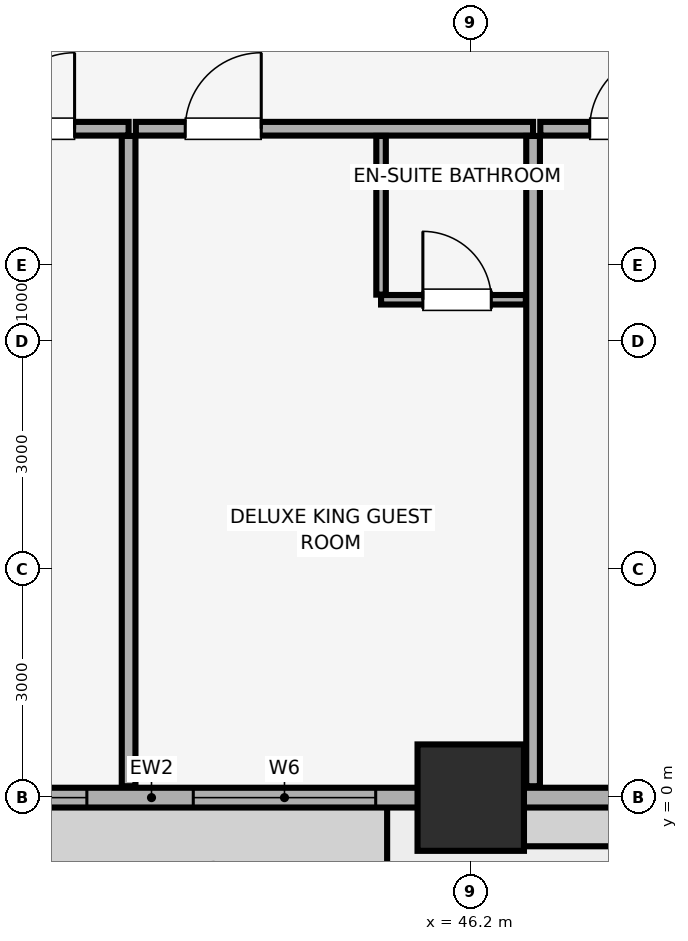
"""IFC4 building model, lengths in metres.
Left out: names, types, materials, properties, quantities, classifications, styles, units other than length and angle.
Written with IfcOpenShell. Run it as: python <this file> out.ifc"""

import sys

from ifc_helpers import new_model, si_unit, direction, frame, frame_2d, origin, origin_2d, place, context, subcontext, project, spatial, rectangle, extrude, element, fill, save


model = new_model("IFC4")
c1 = context("Model", 3, precision=1e-05, world=origin(), true_north=direction((0.0, 1.0)))
c2 = subcontext(c1, "Body", "Model", "MODEL_VIEW")
j1 = project(units=[si_unit("LENGTHUNIT", "METRE"), si_unit("PLANEANGLEUNIT", "RADIAN")], contexts=[c1])
p1 = place(None, origin())
s1 = spatial("IfcSite", under=j1, at=p1, CompositionType="ELEMENT")
p2 = place(p1, origin())
s2 = spatial("IfcBuilding", under=s1, at=p2, CompositionType="ELEMENT")
p3 = place(p2, frame((0.0, 0.0, 35.15)))
s3 = spatial("IfcBuildingStorey", under=s2, at=p3, CompositionType="ELEMENT", Elevation=35.15)
p4 = place(p3, frame((46.2, 0.0, 0.0), z_axis=(0.0, 0.0, 1.0), x_axis=(1.0, 0.0, 0.0)))
e1 = element("IfcColumn", 1, at=p4, inside=s3, PredefinedType="COLUMN", context=c2, shape_type="SweptSolid", body=[
    extrude(rectangle(XDim=1.4, YDim=1.4, at=origin_2d()), origin(), (0.0, 0.0, 1.0), 3.51),
])
p5 = place(p3, frame((4.2, 0.0, 0.0), z_axis=(0.0, 0.0, 1.0), x_axis=(1.0, 0.0, 0.0)))
e2 = element("IfcWall", 2, at=p5, inside=s3, PredefinedType="SOLIDWALL", context=c2, shape_type="SweptSolid", body=[
    extrude(rectangle(XDim=75.6, YDim=0.26, at=frame_2d((37.8, 0.0))), origin(), (0.0, 0.0, 1.0), 2.56),
])
p6 = place(p5, frame((13.517, 0.0, 0.0)))
e3 = element("IfcOpeningElement", 3, at=p6, cuts=e2, PredefinedType="OPENING", context=c2, shape_type="SweptSolid", body=[
    extrude(rectangle(XDim=1.1, YDim=2.15, at=frame_2d((0.55, 1.075))), frame((0.0, 0.14, 0.0), z_axis=(0.0, -1.0, 0.0), x_axis=(1.0, 0.0, 0.0)), (0.0, 0.0, 1.0), 0.28),
])
p7 = place(p5, frame((28.183, 0.0, 0.0)))
e4 = element("IfcOpeningElement", 4, at=p7, cuts=e2, PredefinedType="OPENING", context=c2, shape_type="SweptSolid", body=[
    extrude(rectangle(XDim=1.1, YDim=2.15, at=frame_2d((0.55, 1.075))), frame((0.0, 0.14, 0.0), z_axis=(0.0, -1.0, 0.0), x_axis=(1.0, 0.0, 0.0)), (0.0, 0.0, 1.0), 0.28),
])
p8 = place(p5, frame((60.983, 0.0, 0.0)))
e5 = element("IfcOpeningElement", 5, at=p8, cuts=e2, PredefinedType="OPENING", context=c2, shape_type="SweptSolid", body=[
    extrude(rectangle(XDim=1.1, YDim=2.15, at=frame_2d((0.55, 1.075))), frame((0.0, 0.14, 0.0), z_axis=(0.0, -1.0, 0.0), x_axis=(1.0, 0.0, 0.0)), (0.0, 0.0, 1.0), 0.28),
])
p9 = place(p5, frame((1.035, 0.0, 0.85)))
e6 = element("IfcOpeningElement", 6, at=p9, cuts=e2, PredefinedType="OPENING", context=c2, shape_type="SweptSolid", body=[
    extrude(rectangle(XDim=2.4, YDim=1.5, at=frame_2d((1.2, 0.75))), frame((0.0, 0.14, 0.0), z_axis=(0.0, -1.0, 0.0), x_axis=(1.0, 0.0, 0.0)), (0.0, 0.0, 1.0), 0.28),
])
p10 = place(p5, frame((7.031, 0.0, 0.85)))
e7 = element("IfcOpeningElement", 7, at=p10, cuts=e2, PredefinedType="OPENING", context=c2, shape_type="SweptSolid", body=[
    extrude(rectangle(XDim=2.4, YDim=1.5, at=frame_2d((1.2, 0.75))), frame((0.0, 0.14, 0.0), z_axis=(0.0, -1.0, 0.0), x_axis=(1.0, 0.0, 0.0)), (0.0, 0.0, 1.0), 0.28),
])
p11 = place(p5, frame((16.757, 0.0, 0.85)))
e8 = element("IfcOpeningElement", 8, at=p11, cuts=e2, PredefinedType="OPENING", context=c2, shape_type="SweptSolid", body=[
    extrude(rectangle(XDim=1.5, YDim=1.4, at=frame_2d((0.75, 0.7))), frame((0.0, 0.14, 0.0), z_axis=(0.0, -1.0, 0.0), x_axis=(1.0, 0.0, 0.0)), (0.0, 0.0, 1.0), 0.28),
])
p12 = place(p5, frame((22.567, 0.0, 0.85)))
e9 = element("IfcOpeningElement", 9, at=p12, cuts=e2, PredefinedType="OPENING", context=c2, shape_type="SweptSolid", body=[
    extrude(rectangle(XDim=2.4, YDim=1.5, at=frame_2d((1.2, 0.75))), frame((0.0, 0.14, 0.0), z_axis=(0.0, -1.0, 0.0), x_axis=(1.0, 0.0, 0.0)), (0.0, 0.0, 1.0), 0.28),
])
p13 = place(p5, frame((30.065, 0.0, 0.85)))
e10 = element("IfcOpeningElement", 10, at=p13, cuts=e2, PredefinedType="OPENING", context=c2, shape_type="SweptSolid", body=[
    extrude(rectangle(XDim=1.5, YDim=1.4, at=frame_2d((0.75, 0.7))), frame((0.0, 0.14, 0.0), z_axis=(0.0, -1.0, 0.0), x_axis=(1.0, 0.0, 0.0)), (0.0, 0.0, 1.0), 0.28),
])
p14 = place(p5, frame((34.55, 0.0, 0.85)))
e11 = element("IfcOpeningElement", 11, at=p14, cuts=e2, PredefinedType="OPENING", context=c2, shape_type="SweptSolid", body=[
    extrude(rectangle(XDim=2.4, YDim=1.5, at=frame_2d((1.2, 0.75))), frame((0.0, 0.14, 0.0), z_axis=(0.0, -1.0, 0.0), x_axis=(1.0, 0.0, 0.0)), (0.0, 0.0, 1.0), 0.28),
])
p15 = place(p5, frame((38.35, 0.0, 0.85)))
e12 = element("IfcOpeningElement", 12, at=p15, cuts=e2, PredefinedType="OPENING", context=c2, shape_type="SweptSolid", body=[
    extrude(rectangle(XDim=2.4, YDim=1.5, at=frame_2d((1.2, 0.75))), frame((0.0, 0.14, 0.0), z_axis=(0.0, -1.0, 0.0), x_axis=(1.0, 0.0, 0.0)), (0.0, 0.0, 1.0), 0.28),
])
p16 = place(p5, frame((44.281, 0.0, 0.85)))
e13 = element("IfcOpeningElement", 13, at=p16, cuts=e2, PredefinedType="OPENING", context=c2, shape_type="SweptSolid", body=[
    extrude(rectangle(XDim=2.4, YDim=1.5, at=frame_2d((1.2, 0.75))), frame((0.0, 0.14, 0.0), z_axis=(0.0, -1.0, 0.0), x_axis=(1.0, 0.0, 0.0)), (0.0, 0.0, 1.0), 0.28),
])
p17 = place(p5, frame((50.332, 0.0, 0.85)))
e14 = element("IfcOpeningElement", 14, at=p17, cuts=e2, PredefinedType="OPENING", context=c2, shape_type="SweptSolid", body=[
    extrude(rectangle(XDim=2.4, YDim=1.5, at=frame_2d((1.2, 0.75))), frame((0.0, 0.14, 0.0), z_axis=(0.0, -1.0, 0.0), x_axis=(1.0, 0.0, 0.0)), (0.0, 0.0, 1.0), 0.28),
])
p18 = place(p5, frame((53.981, 0.0, 0.85)))
e15 = element("IfcOpeningElement", 15, at=p18, cuts=e2, PredefinedType="OPENING", context=c2, shape_type="SweptSolid", body=[
    extrude(rectangle(XDim=1.5, YDim=1.4, at=frame_2d((0.75, 0.7))), frame((0.0, 0.14, 0.0), z_axis=(0.0, -1.0, 0.0), x_axis=(1.0, 0.0, 0.0)), (0.0, 0.0, 1.0), 0.28),
])
p19 = place(p5, frame((64.759, 0.0, 0.85)))
e16 = element("IfcOpeningElement", 16, at=p19, cuts=e2, PredefinedType="OPENING", context=c2, shape_type="SweptSolid", body=[
    extrude(rectangle(XDim=1.5, YDim=1.4, at=frame_2d((0.75, 0.7))), frame((0.0, 0.14, 0.0), z_axis=(0.0, -1.0, 0.0), x_axis=(1.0, 0.0, 0.0)), (0.0, 0.0, 1.0), 0.28),
])
p20 = place(p5, frame((67.509, 0.0, 0.85)))
e17 = element("IfcOpeningElement", 17, at=p20, cuts=e2, PredefinedType="OPENING", context=c2, shape_type="SweptSolid", body=[
    extrude(rectangle(XDim=2.4, YDim=1.5, at=frame_2d((1.2, 0.75))), frame((0.0, 0.14, 0.0), z_axis=(0.0, -1.0, 0.0), x_axis=(1.0, 0.0, 0.0)), (0.0, 0.0, 1.0), 0.28),
])
p21 = place(p5, frame((72.165, 0.0, 0.85)))
e18 = element("IfcOpeningElement", 18, at=p21, cuts=e2, PredefinedType="OPENING", context=c2, shape_type="SweptSolid", body=[
    extrude(rectangle(XDim=2.4, YDim=1.5, at=frame_2d((1.2, 0.75))), frame((0.0, 0.14, 0.0), z_axis=(0.0, -1.0, 0.0), x_axis=(1.0, 0.0, 0.0)), (0.0, 0.0, 1.0), 0.28),
])
p22 = place(p3, frame((36.472, 8.8, 0.0), z_axis=(0.0, 0.0, 1.0), x_axis=(1.0, 0.0, 0.0)))
e19 = element("IfcWall", 19, at=p22, inside=s3, PredefinedType="PARTITIONING", context=c2, shape_type="SweptSolid", body=[
    extrude(rectangle(XDim=5.226, YDim=0.18, at=frame_2d((2.613, 0.0))), origin(), (0.0, 0.0, 1.0), 3.51),
])
p23 = place(p22, frame((3.516, 0.0, 0.0)))
e20 = element("IfcOpeningElement", 20, at=p23, cuts=e19, PredefinedType="OPENING", context=c2, shape_type="SweptSolid", body=[
    extrude(rectangle(XDim=1.0, YDim=2.15, at=frame_2d((0.5, 1.075))), frame((0.0, 0.1, 0.0), z_axis=(0.0, -1.0, 0.0), x_axis=(1.0, 0.0, 0.0)), (0.0, 0.0, 1.0), 0.2),
])
p24 = place(p3, frame((41.699, 0.15, 0.0), z_axis=(0.0, 0.0, 1.0), x_axis=(0.0, 1.0, 0.0)))
e21 = element("IfcWall", 21, at=p24, inside=s3, PredefinedType="PARTITIONING", context=c2, shape_type="SweptSolid", body=[
    extrude(rectangle(XDim=8.555, YDim=0.18, at=frame_2d((4.278, 0.0))), origin(), (0.0, 0.0, 1.0), 3.51),
])
p25 = place(p3, frame((41.794, 8.8, 0.0), z_axis=(0.0, 0.0, 1.0), x_axis=(1.0, 0.0, 0.0)))
e22 = element("IfcWall", 22, at=p25, inside=s3, PredefinedType="PARTITIONING", context=c2, shape_type="SweptSolid", body=[
    extrude(rectangle(XDim=5.226, YDim=0.18, at=frame_2d((2.613, 0.0))), origin(), (0.0, 0.0, 1.0), 3.51),
])
p26 = place(p25, frame((0.65, 0.0, 0.0)))
e23 = element("IfcOpeningElement", 23, at=p26, cuts=e22, PredefinedType="OPENING", context=c2, shape_type="SweptSolid", body=[
    extrude(rectangle(XDim=1.0, YDim=2.15, at=frame_2d((0.5, 1.075))), frame((0.0, 0.1, 0.0), z_axis=(0.0, -1.0, 0.0), x_axis=(1.0, 0.0, 0.0)), (0.0, 0.0, 1.0), 0.2),
])
p27 = place(p3, frame((47.02, 0.15, 0.0), z_axis=(0.0, 0.0, 1.0), x_axis=(0.0, 1.0, 0.0)))
e24 = element("IfcWall", 24, at=p27, inside=s3, PredefinedType="PARTITIONING", context=c2, shape_type="SweptSolid", body=[
    extrude(rectangle(XDim=8.555, YDim=0.18, at=frame_2d((4.278, 0.0))), origin(), (0.0, 0.0, 1.0), 3.51),
])
p28 = place(p3, frame((45.02, 6.55, 0.0), z_axis=(0.0, 0.0, 1.0), x_axis=(1.0, 0.0, 0.0)))
e25 = element("IfcWall", 25, at=p28, inside=s3, PredefinedType="PARTITIONING", context=c2, shape_type="SweptSolid", body=[
    extrude(rectangle(XDim=1.905, YDim=0.125, at=frame_2d((0.953, 0.0))), origin(), (0.0, 0.0, 1.0), 3.51),
])
p29 = place(p28, frame((0.55, 0.0, 0.0)))
e26 = element("IfcOpeningElement", 26, at=p29, cuts=e25, PredefinedType="OPENING", context=c2, shape_type="SweptSolid", body=[
    extrude(rectangle(XDim=0.9, YDim=2.1, at=frame_2d((0.45, 1.05))), frame((0.0, 0.073, 0.0), z_axis=(0.0, -1.0, 0.0), x_axis=(1.0, 0.0, 0.0)), (0.0, 0.0, 1.0), 0.145),
])
p30 = place(p3, frame((45.02, 6.617, 0.0), z_axis=(0.0, 0.0, 1.0), x_axis=(0.0, 1.0, 0.0)))
e27 = element("IfcWall", 27, at=p30, inside=s3, PredefinedType="PARTITIONING", context=c2, shape_type="SweptSolid", body=[
    extrude(rectangle(XDim=2.088, YDim=0.125, at=frame_2d((1.044, 0.0))), origin(), (0.0, 0.0, 1.0), 3.51),
])
p31 = place(p3, frame((47.115, 8.8, 0.0), z_axis=(0.0, 0.0, 1.0), x_axis=(1.0, 0.0, 0.0)))
e28 = element("IfcWall", 28, at=p31, inside=s3, PredefinedType="PARTITIONING", context=c2, shape_type="SweptSolid", body=[
    extrude(rectangle(XDim=5.226, YDim=0.18, at=frame_2d((2.613, 0.0))), origin(), (0.0, 0.0, 1.0), 3.51),
])
p32 = place(p31, frame((0.65, 0.0, 0.0)))
e29 = element("IfcOpeningElement", 29, at=p32, cuts=e28, PredefinedType="OPENING", context=c2, shape_type="SweptSolid", body=[
    extrude(rectangle(XDim=1.0, YDim=2.15, at=frame_2d((0.5, 1.075))), frame((0.0, 0.1, 0.0), z_axis=(0.0, -1.0, 0.0), x_axis=(1.0, 0.0, 0.0)), (0.0, 0.0, 1.0), 0.2),
])
p33 = place(p14, origin())
e30 = element("IfcWindow", 30, at=p33, inside=s3, PartitioningType="SINGLE_PANEL", PredefinedType="WINDOW", context=c2, shape_type="SweptSolid", body=[
    extrude(rectangle(XDim=2.4, YDim=1.5, at=frame_2d((1.2, 0.75))), frame((0.0, 0.03, 0.0), z_axis=(0.0, -1.0, 0.0), x_axis=(1.0, 0.0, 0.0)), (0.0, 0.0, 1.0), 0.06),
])
fill(e11, e30)
p34 = place(p15, origin())
e31 = element("IfcWindow", 31, at=p34, inside=s3, PartitioningType="SINGLE_PANEL", PredefinedType="WINDOW", context=c2, shape_type="SweptSolid", body=[
    extrude(rectangle(XDim=2.4, YDim=1.5, at=frame_2d((1.2, 0.75))), frame((0.0, 0.03, 0.0), z_axis=(0.0, -1.0, 0.0), x_axis=(1.0, 0.0, 0.0)), (0.0, 0.0, 1.0), 0.06),
])
fill(e12, e31)
p35 = place(p23, origin())
e32 = element("IfcDoor", 32, at=p35, inside=s3, OperationType="SINGLE_SWING_RIGHT", PredefinedType="DOOR", context=c2, shape_type="SweptSolid", body=[
    extrude(rectangle(XDim=1.0, YDim=2.15, at=frame_2d((0.5, 1.075))), frame((0.0, 0.025, 0.0), z_axis=(0.0, -1.0, 0.0), x_axis=(1.0, 0.0, 0.0)), (0.0, 0.0, 1.0), 0.05),
])
fill(e20, e32)
p36 = place(p26, origin())
e33 = element("IfcDoor", 33, at=p36, inside=s3, OperationType="SINGLE_SWING_RIGHT", PredefinedType="DOOR", context=c2, shape_type="SweptSolid", body=[
    extrude(rectangle(XDim=1.0, YDim=2.15, at=frame_2d((0.5, 1.075))), frame((0.0, 0.025, 0.0), z_axis=(0.0, -1.0, 0.0), x_axis=(1.0, 0.0, 0.0)), (0.0, 0.0, 1.0), 0.05),
])
fill(e23, e33)
p37 = place(p29, origin())
e34 = element("IfcDoor", 34, at=p37, inside=s3, OperationType="SINGLE_SWING_LEFT", PredefinedType="DOOR", context=c2, shape_type="SweptSolid", body=[
    extrude(rectangle(XDim=0.9, YDim=2.1, at=frame_2d((0.45, 1.05))), frame((0.0, 0.025, 0.0), z_axis=(0.0, -1.0, 0.0), x_axis=(1.0, 0.0, 0.0)), (0.0, 0.0, 1.0), 0.05),
])
fill(e26, e34)
p38 = place(p32, origin())
e35 = element("IfcDoor", 35, at=p38, inside=s3, OperationType="SINGLE_SWING_RIGHT", PredefinedType="DOOR", context=c2, shape_type="SweptSolid", body=[
    extrude(rectangle(XDim=1.0, YDim=2.15, at=frame_2d((0.5, 1.075))), frame((0.0, 0.025, 0.0), z_axis=(0.0, -1.0, 0.0), x_axis=(1.0, 0.0, 0.0)), (0.0, 0.0, 1.0), 0.05),
])
fill(e29, e35)
save(model, sys.argv[1])
